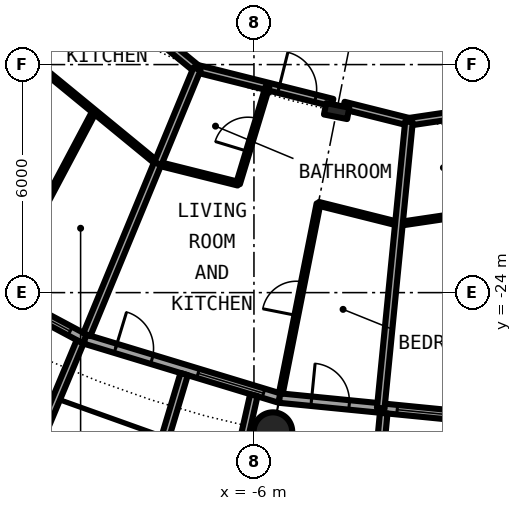
"""IFC4 building model, lengths in metres.
Left out: names, types, materials, properties, quantities, classifications, styles, units other than length and angle.
Written with IfcOpenShell. Run it as: python <this file> out.ifc"""

import sys

from ifc_helpers import new_model, si_unit, direction, frame, frame_2d, origin, origin_2d, place, context, subcontext, project, spatial, rectangle, hollow_circle, i_section, extrude, element, fill, save


model = new_model("IFC4")
c1 = context("Model", 3, precision=1e-05, world=origin(), true_north=direction((0.0, 1.0)))
c2 = subcontext(c1, "Body", "Model", "MODEL_VIEW")
j1 = project(units=[si_unit("LENGTHUNIT", "METRE"), si_unit("PLANEANGLEUNIT", "RADIAN")], contexts=[c1])
p1 = place(None, origin())
s1 = spatial("IfcSite", under=j1, at=p1, CompositionType="ELEMENT")
p2 = place(p1, origin())
s2 = spatial("IfcBuilding", under=s1, at=p2, CompositionType="ELEMENT")
p3 = place(p2, frame((0.0, 0.0, 35.0)))
s3 = spatial("IfcBuildingStorey", under=s2, at=p3, CompositionType="ELEMENT", Elevation=35.0)
p4 = place(p3, frame((-5.501, -27.658, 0.0), z_axis=(0.0, 0.0, 1.0), x_axis=(1.0, 0.0, 0.0)))
e1 = element("IfcColumn", 1, at=p4, inside=s3, PredefinedType="COLUMN", context=c2, shape_type="SweptSolid", body=[
    extrude(hollow_circle(Radius=0.508, WallThickness=0.05, at=origin_2d()), origin(), (0.0, 0.0, 1.0), 3.05),
])
p5 = place(p3, frame((-3.824, -19.223, 0.0), z_axis=(0.0, 0.0, 1.0), x_axis=(-0.195090322016, -0.980785280403, 0.0)))
e2 = element("IfcColumn", 2, at=p5, inside=s3, PredefinedType="COLUMN", context=c2, shape_type="SweptSolid", body=[
    extrude(i_section(OverallWidth=0.305, OverallDepth=0.62, WebThickness=0.021, FlangeThickness=0.04, FilletRadius=0.027, at=origin_2d()), origin(), (0.0, 0.0, 1.0), 3.05),
])
p6 = place(p3, frame((-15.167, -22.699, 0.0), z_axis=(0.0, 0.0, 1.0), x_axis=(0.881915646801, -0.471407246368, 0.0)))
e3 = element("IfcWall", 3, at=p6, inside=s3, PredefinedType="SOLIDWALL", context=c2, shape_type="SweptSolid", body=[
    extrude(rectangle(XDim=5.352, YDim=0.25, at=frame_2d((2.676, 0.0))), origin(), (0.0, 0.0, 1.0), 2.7),
])
p7 = place(p6, frame((0.841, 0.0, 0.0)))
e4 = element("IfcOpeningElement", 4, at=p7, cuts=e3, PredefinedType="OPENING", context=c2, shape_type="SweptSolid", body=[
    extrude(rectangle(XDim=1.0, YDim=2.2, at=frame_2d((0.5, 1.1))), frame((0.0, 0.135, 0.0), z_axis=(0.0, -1.0, 0.0), x_axis=(1.0, 0.0, 0.0)), (0.0, 0.0, 1.0), 0.27),
])
p8 = place(p6, frame((3.111, 0.0, 0.3)))
e5 = element("IfcOpeningElement", 5, at=p8, cuts=e3, PredefinedType="OPENING", context=c2, shape_type="SweptSolid", body=[
    extrude(rectangle(XDim=1.8, YDim=2.1, at=frame_2d((0.9, 1.05))), frame((0.0, 0.135, 0.0), z_axis=(0.0, -1.0, 0.0), x_axis=(1.0, 0.0, 0.0)), (0.0, 0.0, 1.0), 0.27),
])
p9 = place(p3, frame((-10.575, -25.295, -0.03), z_axis=(0.0, 0.0, 1.0), x_axis=(-0.385697364644, -0.922625353492, 0.0)))
e6 = element("IfcWall", 6, at=p9, inside=s3, PredefinedType="SOLIDWALL", context=c2, shape_type="SweptSolid", body=[
    extrude(rectangle(XDim=2.883, YDim=0.2, at=frame_2d((1.442, 0.0))), origin(), (0.0, 0.0, 1.0), 2.73),
])
p10 = place(p3, frame((-10.447, -25.222, 0.0), z_axis=(0.0, 0.0, 1.0), x_axis=(0.956965678721, -0.290201119486, 0.0)))
e7 = element("IfcWall", 7, at=p10, inside=s3, PredefinedType="SOLIDWALL", context=c2, shape_type="SweptSolid", body=[
    extrude(rectangle(XDim=5.351, YDim=0.25, at=frame_2d((2.676, 0.0))), origin(), (0.0, 0.0, 1.0), 2.7),
])
p11 = place(p10, frame((0.841, 0.0, 0.0)))
e8 = element("IfcOpeningElement", 8, at=p11, cuts=e7, PredefinedType="OPENING", context=c2, shape_type="SweptSolid", body=[
    extrude(rectangle(XDim=1.0, YDim=2.2, at=frame_2d((0.5, 1.1))), frame((0.0, 0.135, 0.0), z_axis=(0.0, -1.0, 0.0), x_axis=(1.0, 0.0, 0.0)), (0.0, 0.0, 1.0), 0.27),
])
p12 = place(p10, frame((3.111, 0.0, 0.3)))
e9 = element("IfcOpeningElement", 9, at=p12, cuts=e7, PredefinedType="OPENING", context=c2, shape_type="SweptSolid", body=[
    extrude(rectangle(XDim=1.8, YDim=2.1, at=frame_2d((0.9, 1.05))), frame((0.0, 0.135, 0.0), z_axis=(0.0, -1.0, 0.0), x_axis=(1.0, 0.0, 0.0)), (0.0, 0.0, 1.0), 0.27),
])
p13 = place(p3, frame((-7.837, -26.144, -0.03), z_axis=(0.0, 0.0, 1.0), x_axis=(-0.287064767992, -0.957911174889, 0.0)))
e10 = element("IfcWall", 10, at=p13, inside=s3, PredefinedType="SOLIDWALL", context=c2, shape_type="SweptSolid", body=[
    extrude(rectangle(XDim=3.006, YDim=0.2, at=frame_2d((1.503, 0.0))), origin(), (0.0, 0.0, 1.0), 2.73),
])
p14 = place(p3, frame((-6.004, -26.7, -0.03), z_axis=(0.0, 0.0, 1.0), x_axis=(-0.219609259383, -0.975587911566, 0.0)))
e11 = element("IfcWall", 11, at=p14, inside=s3, PredefinedType="SOLIDWALL", context=c2, shape_type="SweptSolid", body=[
    extrude(rectangle(XDim=2.933, YDim=0.2, at=frame_2d((1.466, 0.0))), origin(), (0.0, 0.0, 1.0), 2.73),
])
p15 = place(p3, frame((-5.326, -26.775, 0.0), z_axis=(0.0, 0.0, 1.0), x_axis=(0.995173996315, -0.098126026407, 0.0)))
e12 = element("IfcWall", 12, at=p15, inside=s3, PredefinedType="SOLIDWALL", context=c2, shape_type="SweptSolid", body=[
    extrude(rectangle(XDim=5.352, YDim=0.25, at=frame_2d((2.676, 0.0))), origin(), (0.0, 0.0, 1.0), 2.7),
])
p16 = place(p15, frame((0.841, 0.0, 0.0)))
e13 = element("IfcOpeningElement", 13, at=p16, cuts=e12, PredefinedType="OPENING", context=c2, shape_type="SweptSolid", body=[
    extrude(rectangle(XDim=1.0, YDim=2.2, at=frame_2d((0.5, 1.1))), frame((0.0, 0.135, 0.0), z_axis=(0.0, -1.0, 0.0), x_axis=(1.0, 0.0, 0.0)), (0.0, 0.0, 1.0), 0.27),
])
p17 = place(p15, frame((3.111, 0.0, 0.3)))
e14 = element("IfcOpeningElement", 14, at=p17, cuts=e12, PredefinedType="OPENING", context=c2, shape_type="SweptSolid", body=[
    extrude(rectangle(XDim=1.8, YDim=2.1, at=frame_2d((0.9, 1.05))), frame((0.0, 0.135, 0.0), z_axis=(0.0, -1.0, 0.0), x_axis=(1.0, 0.0, 0.0)), (0.0, 0.0, 1.0), 0.27),
])
p18 = place(p3, frame((-2.586, -27.171, -0.03), z_axis=(0.0, 0.0, 1.0), x_axis=(-0.094548432284, -0.995520262954, 0.0)))
e15 = element("IfcWall", 15, at=p18, inside=s3, PredefinedType="SOLIDWALL", context=c2, shape_type="SweptSolid", body=[
    extrude(rectangle(XDim=3.006, YDim=0.2, at=frame_2d((1.503, 0.0))), origin(), (0.0, 0.0, 1.0), 2.73),
])
for number, where, z_axis, x_axis in (
    (16, (-8.534, -20.603, 0.0), (0.0, 0.0, 1.0), (0.97, -0.243, 0.0)),
    (17, (-4.302, -21.663, 0.0), (0.0, 0.0, 1.0), (0.97, -0.243, 0.0)),
):
    element("IfcWall", number, at=place(p3, frame(where, z_axis=z_axis, x_axis=x_axis)), inside=s3, PredefinedType="PARTITIONING", context=c2, shape_type="SweptSolid", body=[
        extrude(rectangle(XDim=2.181, YDim=0.1, at=frame_2d((1.091, 0.0))), origin(), (0.0, 0.0, 1.0), 2.7),
    ])
p19 = place(p3, frame((-2.186, -22.193, 0.0), z_axis=(0.0, 0.0, 1.0), x_axis=(0.989171386505, 0.146765009863, 0.0)))
e18 = element("IfcWall", 18, at=p19, inside=s3, PredefinedType="PARTITIONING", context=c2, shape_type="SweptSolid", body=[
    extrude(rectangle(XDim=2.167, YDim=0.1, at=frame_2d((1.084, 0.0))), origin(), (0.0, 0.0, 1.0), 2.7),
])
p20 = place(p3, frame((-13.538, -16.496, 0.0), z_axis=(0.0, 0.0, 1.0), x_axis=(0.773000340237, -0.634405606843, 0.0)))
e19 = element("IfcWall", 19, at=p20, inside=s3, PredefinedType="PARTITIONING", context=c2, shape_type="SweptSolid", body=[
    extrude(rectangle(XDim=6.474, YDim=0.1, at=frame_2d((3.237, 0.0))), origin(), (0.0, 0.0, 1.0), 2.7),
])
p21 = place(p3, frame((-7.501, -18.108, 0.0), z_axis=(0.0, 0.0, 1.0), x_axis=(0.970040840928, -0.242941900323, 0.0)))
e20 = element("IfcWall", 20, at=p21, inside=s3, PredefinedType="PARTITIONING", context=c2, shape_type="SweptSolid", body=[
    extrude(rectangle(XDim=3.676, YDim=0.2, at=frame_2d((1.838, 0.0))), origin(), (0.0, 0.0, 1.0), 2.38),
])
p22 = place(p21, frame((2.217, 0.0, 0.0)))
e21 = element("IfcOpeningElement", 21, at=p22, cuts=e20, PredefinedType="OPENING", context=c2, shape_type="SweptSolid", body=[
    extrude(rectangle(XDim=1.0, YDim=2.3, at=frame_2d((0.5, 1.15))), frame((0.0, 0.11, 0.0), z_axis=(0.0, -1.0, 0.0), x_axis=(1.0, 0.0, 0.0)), (0.0, 0.0, 1.0), 0.22),
])
p23 = place(p3, frame((-3.639, -19.076, 0.0), z_axis=(0.0, 0.0, 1.0), x_axis=(0.970053237222, -0.242892397895, 0.0)))
e22 = element("IfcWall", 22, at=p23, inside=s3, PredefinedType="PARTITIONING", context=c2, shape_type="SweptSolid", body=[
    extrude(rectangle(XDim=1.771, YDim=0.2, at=frame_2d((0.885, 0.0))), origin(), (0.0, 0.0, 1.0), 2.38),
])
p24 = place(p3, frame((-1.927, -19.506, 0.0), z_axis=(0.0, 0.0, 1.0), x_axis=(0.989181308547, 0.146698121399, 0.0)))
e23 = element("IfcWall", 23, at=p24, inside=s3, PredefinedType="PARTITIONING", context=c2, shape_type="SweptSolid", body=[
    extrude(rectangle(XDim=9.531, YDim=0.2, at=frame_2d((4.766, 0.0))), origin(), (0.0, 0.0, 1.0), 2.38),
])
p25 = place(p24, frame((3.316, 0.0, 0.0)))
e24 = element("IfcOpeningElement", 24, at=p25, cuts=e23, PredefinedType="OPENING", context=c2, shape_type="SweptSolid", body=[
    extrude(rectangle(XDim=1.0, YDim=2.3, at=frame_2d((0.5, 1.15))), frame((0.0, 0.11, 0.0), z_axis=(0.0, -1.0, 0.0), x_axis=(1.0, 0.0, 0.0)), (0.0, 0.0, 1.0), 0.22),
])
p26 = place(p3, frame((-16.173, -10.99, 0.0), z_axis=(0.0, 0.0, 1.0), x_axis=(0.772704887747, -0.634765434198, 0.0)))
e25 = element("IfcWall", 25, at=p26, inside=s3, PredefinedType="PARTITIONING", context=c2, shape_type="SweptSolid", body=[
    extrude(rectangle(XDim=11.209, YDim=0.2, at=frame_2d((5.604, 0.0))), origin(), (0.0, 0.0, 1.0), 2.38),
])
p27 = place(p26, frame((3.137, 0.0, 0.0)))
e26 = element("IfcOpeningElement", 26, at=p27, cuts=e25, PredefinedType="OPENING", context=c2, shape_type="SweptSolid", body=[
    extrude(rectangle(XDim=1.0, YDim=2.3, at=frame_2d((0.5, 1.15))), frame((0.0, 0.11, 0.0), z_axis=(0.0, -1.0, 0.0), x_axis=(1.0, 0.0, 0.0)), (0.0, 0.0, 1.0), 0.22),
])
p28 = place(p3, frame((-12.734, -24.007, 0.0), z_axis=(0.0, 0.0, 1.0), x_axis=(0.468610030042, 0.883405139075, 0.0)))
e27 = element("IfcWall", 27, at=p28, inside=s3, PredefinedType="PARTITIONING", context=c2, shape_type="SweptSolid", body=[
    extrude(rectangle(XDim=5.403, YDim=0.1, at=frame_2d((2.702, 0.0))), origin(), (0.0, 0.0, 1.0), 2.7),
])
p29 = place(p28, frame((2.252, 0.0, 0.0)))
e28 = element("IfcOpeningElement", 28, at=p29, cuts=e27, PredefinedType="OPENING", context=c2, shape_type="SweptSolid", body=[
    extrude(rectangle(XDim=0.9, YDim=2.3, at=frame_2d((0.45, 1.15))), frame((0.0, 0.06, 0.0), z_axis=(0.0, -1.0, 0.0), x_axis=(1.0, 0.0, 0.0)), (0.0, 0.0, 1.0), 0.12),
])
p30 = place(p3, frame((-10.399, -25.106, 0.0), z_axis=(0.0, 0.0, 1.0), x_axis=(0.382651153718, 0.923892902104, 0.0)))
e29 = element("IfcWall", 29, at=p30, inside=s3, PredefinedType="PARTITIONING", context=c2, shape_type="SweptSolid", body=[
    extrude(rectangle(XDim=4.874, YDim=0.2, at=frame_2d((2.437, 0.0))), origin(), (0.0, 0.0, 1.0), 2.7),
])
p31 = place(p3, frame((-8.529, -20.605, 0.0), z_axis=(0.0, 0.0, 1.0), x_axis=(0.382540781694, 0.923938607452, 0.0)))
e30 = element("IfcWall", 30, at=p31, inside=s3, PredefinedType="PARTITIONING", context=c2, shape_type="SweptSolid", body=[
    extrude(rectangle(XDim=2.7, YDim=0.2, at=frame_2d((1.35, 0.0))), origin(), (0.0, 0.0, 1.0), 2.7),
])
p32 = place(p3, frame((-6.418, -21.133, 0.0), z_axis=(0.0, 0.0, 1.0), x_axis=(0.290478618436, 0.956881482855, 0.0)))
e31 = element("IfcWall", 31, at=p32, inside=s3, PredefinedType="PARTITIONING", context=c2, shape_type="SweptSolid", body=[
    extrude(rectangle(XDim=2.674, YDim=0.1, at=frame_2d((1.337, 0.0))), origin(), (0.0, 0.0, 1.0), 2.7),
])
p33 = place(p32, frame((0.887, 0.0, 0.0)))
e32 = element("IfcOpeningElement", 32, at=p33, cuts=e31, PredefinedType="OPENING", context=c2, shape_type="SweptSolid", body=[
    extrude(rectangle(XDim=0.9, YDim=2.3, at=frame_2d((0.45, 1.15))), frame((0.0, 0.06, 0.0), z_axis=(0.0, -1.0, 0.0), x_axis=(1.0, 0.0, 0.0)), (0.0, 0.0, 1.0), 0.12),
])
p34 = place(p3, frame((-5.293, -26.655, 0.0), z_axis=(0.0, 0.0, 1.0), x_axis=(0.194713709563, 0.980860118115, 0.0)))
e33 = element("IfcWall", 33, at=p34, inside=s3, PredefinedType="PARTITIONING", context=c2, shape_type="SweptSolid", body=[
    extrude(rectangle(XDim=5.089, YDim=0.1, at=frame_2d((2.545, 0.0))), origin(), (0.0, 0.0, 1.0), 2.7),
])
p35 = place(p34, frame((2.095, 0.0, 0.0)))
e34 = element("IfcOpeningElement", 34, at=p35, cuts=e33, PredefinedType="OPENING", context=c2, shape_type="SweptSolid", body=[
    extrude(rectangle(XDim=0.9, YDim=2.3, at=frame_2d((0.45, 1.15))), frame((0.0, 0.06, 0.0), z_axis=(0.0, -1.0, 0.0), x_axis=(1.0, 0.0, 0.0)), (0.0, 0.0, 1.0), 0.12),
])
p36 = place(p3, frame((-2.664, -27.044, 0.0), z_axis=(0.0, 0.0, 1.0), x_axis=(0.098115395479, 0.995175044487, 0.0)))
e35 = element("IfcWall", 35, at=p36, inside=s3, PredefinedType="PARTITIONING", context=c2, shape_type="SweptSolid", body=[
    extrude(rectangle(XDim=7.574, YDim=0.2, at=frame_2d((3.787, 0.0))), origin(), (0.0, 0.0, 1.0), 2.7),
])
p37 = place(p8, origin())
e36 = element("IfcWindow", 36, at=p37, inside=s3, PartitioningType="SINGLE_PANEL", PredefinedType="WINDOW", context=c2, shape_type="SweptSolid", body=[
    extrude(rectangle(XDim=1.8, YDim=2.1, at=frame_2d((0.9, 1.05))), frame((0.0, 0.03, 0.0), z_axis=(0.0, -1.0, 0.0), x_axis=(1.0, 0.0, 0.0)), (0.0, 0.0, 1.0), 0.06),
])
fill(e5, e36)
p38 = place(p11, origin())
e37 = element("IfcDoor", 37, at=p38, inside=s3, OperationType="SINGLE_SWING_LEFT", PredefinedType="DOOR", context=c2, shape_type="SweptSolid", body=[
    extrude(rectangle(XDim=1.0, YDim=2.2, at=frame_2d((0.5, 1.1))), frame((0.0, 0.025, 0.0), z_axis=(0.0, -1.0, 0.0), x_axis=(1.0, 0.0, 0.0)), (0.0, 0.0, 1.0), 0.05),
])
fill(e8, e37)
p39 = place(p12, origin())
e38 = element("IfcWindow", 38, at=p39, inside=s3, PartitioningType="SINGLE_PANEL", PredefinedType="WINDOW", context=c2, shape_type="SweptSolid", body=[
    extrude(rectangle(XDim=1.8, YDim=2.1, at=frame_2d((0.9, 1.05))), frame((0.0, 0.03, 0.0), z_axis=(0.0, -1.0, 0.0), x_axis=(1.0, 0.0, 0.0)), (0.0, 0.0, 1.0), 0.06),
])
fill(e9, e38)
p40 = place(p16, origin())
e39 = element("IfcDoor", 39, at=p40, inside=s3, OperationType="SINGLE_SWING_LEFT", PredefinedType="DOOR", context=c2, shape_type="SweptSolid", body=[
    extrude(rectangle(XDim=1.0, YDim=2.2, at=frame_2d((0.5, 1.1))), frame((0.0, 0.025, 0.0), z_axis=(0.0, -1.0, 0.0), x_axis=(1.0, 0.0, 0.0)), (0.0, 0.0, 1.0), 0.05),
])
fill(e13, e39)
p41 = place(p17, origin())
e40 = element("IfcWindow", 40, at=p41, inside=s3, PartitioningType="SINGLE_PANEL", PredefinedType="WINDOW", context=c2, shape_type="SweptSolid", body=[
    extrude(rectangle(XDim=1.8, YDim=2.1, at=frame_2d((0.9, 1.05))), frame((0.0, 0.03, 0.0), z_axis=(0.0, -1.0, 0.0), x_axis=(1.0, 0.0, 0.0)), (0.0, 0.0, 1.0), 0.06),
])
fill(e14, e40)
p42 = place(p29, origin())
e41 = element("IfcDoor", 41, at=p42, inside=s3, OperationType="SINGLE_SWING_LEFT", PredefinedType="DOOR", context=c2, shape_type="SweptSolid", body=[
    extrude(rectangle(XDim=0.9, YDim=2.3, at=frame_2d((0.45, 1.15))), frame((0.0, 0.025, 0.0), z_axis=(0.0, -1.0, 0.0), x_axis=(1.0, 0.0, 0.0)), (0.0, 0.0, 1.0), 0.05),
])
fill(e28, e41)
p43 = place(p22, origin())
e42 = element("IfcDoor", 42, at=p43, inside=s3, OperationType="SINGLE_SWING_RIGHT", PredefinedType="DOOR", context=c2, shape_type="SweptSolid", body=[
    extrude(rectangle(XDim=1.0, YDim=2.3, at=frame_2d((0.5, 1.15))), frame((0.0, 0.025, 0.0), z_axis=(0.0, -1.0, 0.0), x_axis=(1.0, 0.0, 0.0)), (0.0, 0.0, 1.0), 0.05),
])
fill(e21, e42)
p44 = place(p33, origin())
e43 = element("IfcDoor", 43, at=p44, inside=s3, OperationType="SINGLE_SWING_LEFT", PredefinedType="DOOR", context=c2, shape_type="SweptSolid", body=[
    extrude(rectangle(XDim=0.9, YDim=2.3, at=frame_2d((0.45, 1.15))), frame((0.0, 0.025, 0.0), z_axis=(0.0, -1.0, 0.0), x_axis=(1.0, 0.0, 0.0)), (0.0, 0.0, 1.0), 0.05),
])
fill(e32, e43)
p45 = place(p35, origin())
e44 = element("IfcDoor", 44, at=p45, inside=s3, OperationType="SINGLE_SWING_RIGHT", PredefinedType="DOOR", context=c2, shape_type="SweptSolid", body=[
    extrude(rectangle(XDim=0.9, YDim=2.3, at=frame_2d((0.45, 1.15))), frame((0.0, 0.025, 0.0), z_axis=(0.0, -1.0, 0.0), x_axis=(1.0, 0.0, 0.0)), (0.0, 0.0, 1.0), 0.05),
])
fill(e34, e44)
save(model, sys.argv[1])
